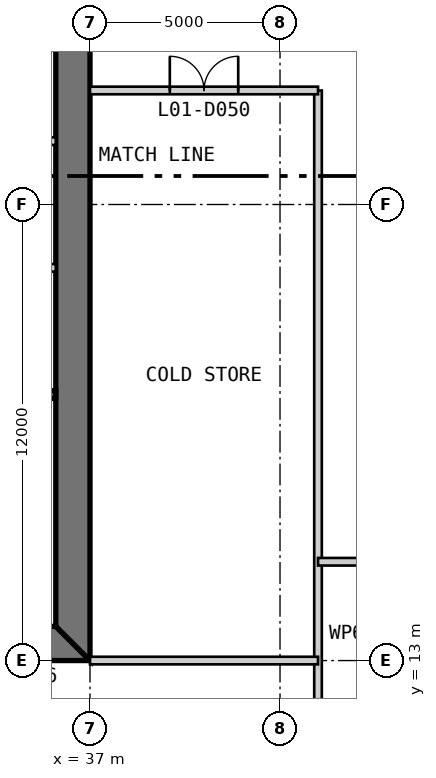
"""IFC4 building model, lengths in metres.
Left out: names, types, materials, properties, quantities, classifications, styles, units other than length and angle.
Written with IfcOpenShell. Run it as: python <this file> out.ifc"""

import sys

from ifc_helpers import new_model, si_unit, direction, frame, frame_2d, origin, place, context, subcontext, project, spatial, polyline, rectangle, outline, extrude, element, fill, save


model = new_model("IFC4")
c1 = context("Model", 3, precision=1e-05, world=origin(), true_north=direction((0.0, 1.0)))
c2 = subcontext(c1, "Body", "Model", "MODEL_VIEW")
j1 = project(units=[si_unit("LENGTHUNIT", "METRE"), si_unit("PLANEANGLEUNIT", "RADIAN")], contexts=[c1])
p1 = place(None, origin())
s1 = spatial("IfcSite", under=j1, at=p1, CompositionType="ELEMENT")
p2 = place(p1, origin())
s2 = spatial("IfcBuilding", under=s1, at=p2, CompositionType="ELEMENT")
p3 = place(p2, frame((0.0, 0.0, 7.0)))
s3 = spatial("IfcBuildingStorey", under=s2, at=p3, CompositionType="ELEMENT", Elevation=7.0)
p4 = place(p3, frame((13.0, 13.45, 0.0), z_axis=(0.0, 0.0, 1.0), x_axis=(1.0, 0.0, 0.0)))
e1 = element("IfcWall", 1, at=p4, inside=s3, PredefinedType="SHEAR", context=c2, shape_type="SweptSolid", body=[
    extrude(outline(polyline([(0.0, -0.45), (24.0, -0.45), (23.1, 0.45), (0.9, 0.45), (0.0, -0.45)])), origin(), (0.0, 0.0, 1.0), 4.8),
])
p5 = place(p4, frame((4.9, 0.0, 0.0)))
e2 = element("IfcOpeningElement", 2, at=p5, cuts=e1, PredefinedType="OPENING", context=c2, shape_type="SweptSolid", body=[
    extrude(rectangle(XDim=1.0, YDim=2.2, at=frame_2d((0.5, 1.1))), frame((0.0, 0.46, 0.0), z_axis=(0.0, -1.0, 0.0), x_axis=(1.0, 0.0, 0.0)), (0.0, 0.0, 1.0), 0.92),
])
p6 = place(p4, frame((8.9, 0.0, 0.0)))
e3 = element("IfcOpeningElement", 3, at=p6, cuts=e1, PredefinedType="OPENING", context=c2, shape_type="SweptSolid", body=[
    extrude(rectangle(XDim=1.1, YDim=2.2, at=frame_2d((0.55, 1.1))), frame((0.0, 0.46, 0.0), z_axis=(0.0, -1.0, 0.0), x_axis=(1.0, 0.0, 0.0)), (0.0, 0.0, 1.0), 0.92),
])
p7 = place(p4, frame((15.05, 0.0, 0.0)))
e4 = element("IfcOpeningElement", 4, at=p7, cuts=e1, PredefinedType="OPENING", context=c2, shape_type="SweptSolid", body=[
    extrude(rectangle(XDim=0.9, YDim=2.2, at=frame_2d((0.45, 1.1))), frame((0.0, 0.46, 0.0), z_axis=(0.0, -1.0, 0.0), x_axis=(1.0, 0.0, 0.0)), (0.0, 0.0, 1.0), 0.92),
])
p8 = place(p4, frame((17.9, 0.0, 0.0)))
e5 = element("IfcOpeningElement", 5, at=p8, cuts=e1, PredefinedType="OPENING", context=c2, shape_type="SweptSolid", body=[
    extrude(rectangle(XDim=1.0, YDim=2.2, at=frame_2d((0.5, 1.1))), frame((0.0, 0.46, 0.0), z_axis=(0.0, -1.0, 0.0), x_axis=(1.0, 0.0, 0.0)), (0.0, 0.0, 1.0), 0.92),
])
p9 = place(p4, frame((21.4, 0.0, 0.0)))
e6 = element("IfcOpeningElement", 6, at=p9, cuts=e1, PredefinedType="OPENING", context=c2, shape_type="SweptSolid", body=[
    extrude(rectangle(XDim=1.0, YDim=2.2, at=frame_2d((0.5, 1.1))), frame((0.0, 0.46, 0.0), z_axis=(0.0, -1.0, 0.0), x_axis=(1.0, 0.0, 0.0)), (0.0, 0.0, 1.0), 0.92),
])
p10 = place(p3, frame((36.55, 13.9, 0.0), z_axis=(0.0, 0.0, 1.0), x_axis=(0.0, 1.0, 0.0)))
e7 = element("IfcWall", 7, at=p10, inside=s3, PredefinedType="SHEAR", context=c2, shape_type="SweptSolid", body=[
    extrude(outline(polyline([(-0.9, -0.45), (23.1, -0.45), (22.2, 0.45), (0.0, 0.45), (-0.9, -0.45)])), origin(), (0.0, 0.0, 1.0), 4.8),
])
p11 = place(p10, frame((20.2, 0.0, 0.0)))
e8 = element("IfcOpeningElement", 8, at=p11, cuts=e7, PredefinedType="OPENING", context=c2, shape_type="SweptSolid", body=[
    extrude(rectangle(XDim=1.0, YDim=2.2, at=frame_2d((0.5, 1.1))), frame((0.0, 0.46, 0.0), z_axis=(0.0, -1.0, 0.0), x_axis=(1.0, 0.0, 0.0)), (0.0, 0.0, 1.0), 0.92),
])
p12 = place(p10, frame((17.25, 0.0, 0.0)))
e9 = element("IfcOpeningElement", 9, at=p12, cuts=e7, PredefinedType="OPENING", context=c2, shape_type="SweptSolid", body=[
    extrude(rectangle(XDim=0.9, YDim=2.2, at=frame_2d((0.45, 1.1))), frame((0.0, 0.46, 0.0), z_axis=(0.0, -1.0, 0.0), x_axis=(1.0, 0.0, 0.0)), (0.0, 0.0, 1.0), 0.92),
])
p13 = place(p3, frame((20.3, 20.0, 0.0), z_axis=(0.0, 0.0, 1.0), x_axis=(1.0, 0.0, 0.0)))
e10 = element("IfcWall", 10, at=p13, inside=s3, PredefinedType="SOLIDWALL", context=c2, shape_type="SweptSolid", body=[
    extrude(rectangle(XDim=15.8, YDim=0.2, at=frame_2d((7.9, 0.0))), origin(), (0.0, 0.0, 1.0), 4.6),
])
for number, where, z_axis, x_axis in (
    (11, (36.1, 26.667, 0.0), (0.0, 0.0, 1.0), (-1.0, 0.0, 0.0)),
    (12, (36.1, 23.333, 0.0), (0.0, 0.0, 1.0), (-1.0, 0.0, 0.0)),
):
    element("IfcWall", number, at=place(p3, frame(where, z_axis=z_axis, x_axis=x_axis)), inside=s3, PredefinedType="PARTITIONING", context=c2, shape_type="SweptSolid", body=[
        extrude(rectangle(XDim=2.8, YDim=0.2, at=frame_2d((1.4, 0.0))), origin(), (0.0, 0.0, 1.0), 4.6),
    ])
p14 = place(p3, frame((43.0, -0.6, 0.0), z_axis=(0.0, 0.0, 1.0), x_axis=(0.0, 1.0, 0.0)))
e13 = element("IfcWall", 13, at=p14, inside=s3, PredefinedType="PARTITIONING", context=c2, shape_type="SweptSolid", body=[
    extrude(rectangle(XDim=28.6, YDim=0.2, at=frame_2d((14.3, 0.0))), origin(), (0.0, 0.0, 1.0), 3.843),
])
p15 = place(p14, frame((10.85, 0.0, 0.0)))
e14 = element("IfcOpeningElement", 14, at=p15, cuts=e13, PredefinedType="OPENING", context=c2, shape_type="SweptSolid", body=[
    extrude(rectangle(XDim=0.9, YDim=2.2, at=frame_2d((0.45, 1.1))), frame((0.0, 0.11, 0.0), z_axis=(0.0, -1.0, 0.0), x_axis=(1.0, 0.0, 0.0)), (0.0, 0.0, 1.0), 0.22),
])
p16 = place(p3, frame((37.0, 13.0, 0.0), z_axis=(0.0, 0.0, 1.0), x_axis=(1.0, 0.0, 0.0)))
e15 = element("IfcWall", 15, at=p16, inside=s3, PredefinedType="PARTITIONING", context=c2, shape_type="SweptSolid", body=[
    extrude(rectangle(XDim=6.0, YDim=0.2, at=frame_2d((3.0, 0.0))), origin(), (0.0, 0.0, 1.0), 3.653),
])
p17 = place(p3, frame((43.0, 15.6, 0.0), z_axis=(0.0, 0.0, 1.0), x_axis=(1.0, 0.0, 0.0)))
e16 = element("IfcWall", 16, at=p17, inside=s3, PredefinedType="PARTITIONING", context=c2, shape_type="SweptSolid", body=[
    extrude(rectangle(XDim=22.25, YDim=0.2, at=frame_2d((11.125, 0.0))), origin(), (0.0, 0.0, 1.0), 4.5),
])
p18 = place(p17, frame((10.125, 0.0, 0.0)))
e17 = element("IfcOpeningElement", 17, at=p18, cuts=e16, PredefinedType="OPENING", context=c2, shape_type="SweptSolid", body=[
    extrude(rectangle(XDim=1.8, YDim=2.4, at=frame_2d((0.9, 1.2))), frame((0.0, 0.11, 0.0), z_axis=(0.0, -1.0, 0.0), x_axis=(1.0, 0.0, 0.0)), (0.0, 0.0, 1.0), 0.22),
])
p19 = place(p17, frame((17.425, 0.0, 0.0)))
e18 = element("IfcOpeningElement", 18, at=p19, cuts=e16, PredefinedType="OPENING", context=c2, shape_type="SweptSolid", body=[
    extrude(rectangle(XDim=1.8, YDim=2.4, at=frame_2d((0.9, 1.2))), frame((0.0, 0.11, 0.0), z_axis=(0.0, -1.0, 0.0), x_axis=(1.0, 0.0, 0.0)), (0.0, 0.0, 1.0), 0.22),
])
p20 = place(p17, frame((2.925, 0.0, 0.0)))
e19 = element("IfcOpeningElement", 19, at=p20, cuts=e16, PredefinedType="OPENING", context=c2, shape_type="SweptSolid", body=[
    extrude(rectangle(XDim=1.8, YDim=2.4, at=frame_2d((0.9, 1.2))), frame((0.0, 0.11, 0.0), z_axis=(0.0, -1.0, 0.0), x_axis=(1.0, 0.0, 0.0)), (0.0, 0.0, 1.0), 0.22),
])
p21 = place(p3, frame((37.0, 28.0, 0.0), z_axis=(0.0, 0.0, 1.0), x_axis=(1.0, 0.0, 0.0)))
e20 = element("IfcWall", 20, at=p21, inside=s3, PredefinedType="PARTITIONING", context=c2, shape_type="SweptSolid", body=[
    extrude(rectangle(XDim=6.0, YDim=0.2, at=frame_2d((3.0, 0.0))), origin(), (0.0, 0.0, 1.0), 4.5),
])
p22 = place(p21, frame((2.1, 0.0, 0.0)))
e21 = element("IfcOpeningElement", 21, at=p22, cuts=e20, PredefinedType="OPENING", context=c2, shape_type="SweptSolid", body=[
    extrude(rectangle(XDim=1.8, YDim=2.4, at=frame_2d((0.9, 1.2))), frame((0.0, 0.11, 0.0), z_axis=(0.0, -1.0, 0.0), x_axis=(1.0, 0.0, 0.0)), (0.0, 0.0, 1.0), 0.22),
])
p23 = place(p22, origin())
e22 = element("IfcDoor", 22, at=p23, inside=s3, OperationType="DOUBLE_DOOR_SINGLE_SWING", PredefinedType="DOOR", context=c2, shape_type="SweptSolid", body=[
    extrude(rectangle(XDim=1.8, YDim=2.4, at=frame_2d((0.9, 1.2))), frame((0.0, 0.025, 0.0), z_axis=(0.0, -1.0, 0.0), x_axis=(1.0, 0.0, 0.0)), (0.0, 0.0, 1.0), 0.05),
])
fill(e21, e22)
save(model, sys.argv[1])
